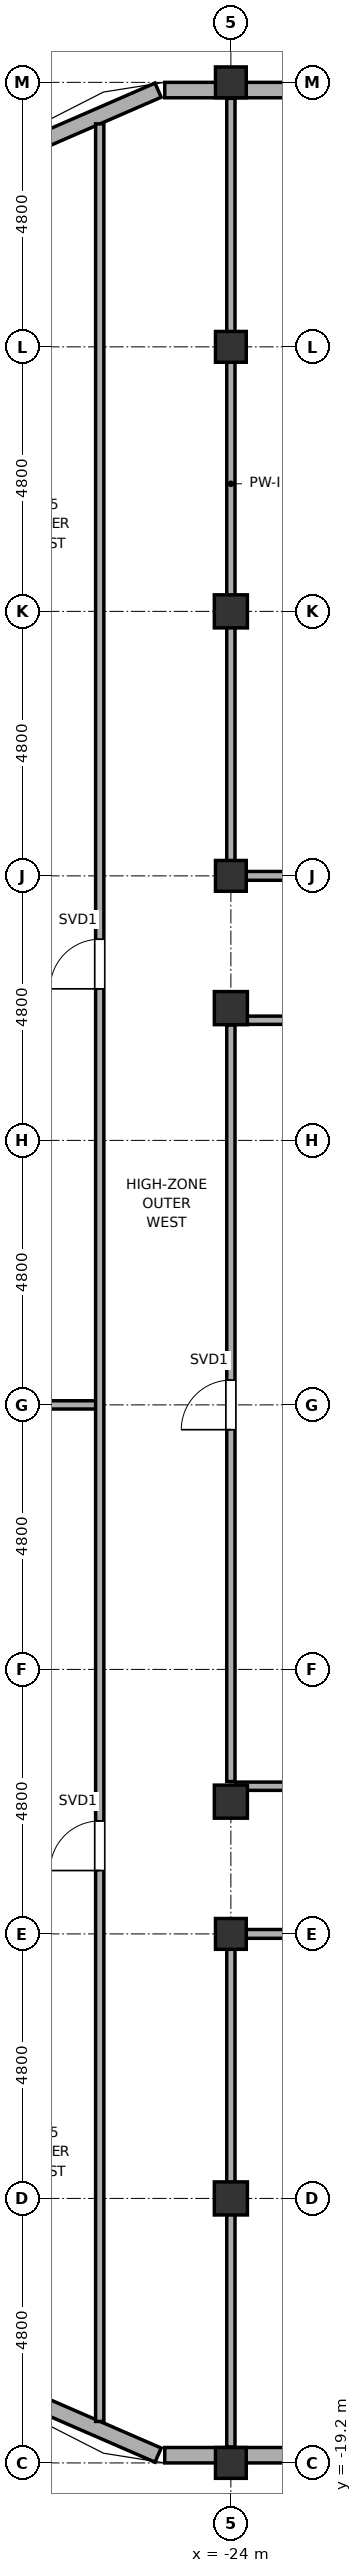
"""IFC4 building model, lengths in metres.
Left out: names, types, materials, properties, quantities, classifications, styles, units other than length and angle.
Written with IfcOpenShell. Run it as: python <this file> out.ifc"""

import sys

from ifc_helpers import new_model, si_unit, direction, frame, frame_2d, origin, origin_2d, place, context, subcontext, project, spatial, rectangle, hollow_rectangle, hollow_circle, extrude, element, fill, save


model = new_model("IFC4")
c1 = context("Model", 3, precision=1e-05, world=origin(), true_north=direction((0.0, 1.0)))
c2 = subcontext(c1, "Body", "Model", "MODEL_VIEW")
j1 = project(units=[si_unit("LENGTHUNIT", "METRE"), si_unit("PLANEANGLEUNIT", "RADIAN")], contexts=[c1])
p1 = place(None, origin())
s1 = spatial("IfcSite", under=j1, at=p1, CompositionType="ELEMENT")
p2 = place(p1, origin())
s2 = spatial("IfcBuilding", under=s1, at=p2, CompositionType="ELEMENT")
p3 = place(p2, frame((0.0, 0.0, 222.3)))
s3 = spatial("IfcBuildingStorey", under=s2, at=p3, CompositionType="ELEMENT", Elevation=222.3)
p4 = place(p3, frame((-24.0, -19.2, 0.0), z_axis=(0.0, 0.0, 1.0), x_axis=(1.0, 0.0, 0.0)))
e1 = element("IfcColumn", 1, at=p4, inside=s3, PredefinedType="COLUMN", context=c2, shape_type="SweptSolid", body=[
    extrude(hollow_circle(Radius=0.28, WallThickness=0.025, at=origin_2d()), origin(), (0.0, 0.0, 1.0), 3.85),
])
p5 = place(p3, frame((-24.0, -14.4, 0.0), z_axis=(0.0, 0.0, 1.0), x_axis=(1.0, 0.0, 0.0)))
e2 = element("IfcColumn", 2, at=p5, inside=s3, PredefinedType="COLUMN", context=c2, shape_type="SweptSolid", body=[
    extrude(hollow_rectangle(XDim=0.6, YDim=0.6, WallThickness=0.028, at=origin_2d()), origin(), (0.0, 0.0, 1.0), 3.85),
])
p6 = place(p3, frame((-24.0, -9.6, 0.0), z_axis=(0.0, 0.0, 1.0), x_axis=(1.0, 0.0, 0.0)))
e3 = element("IfcColumn", 3, at=p6, inside=s3, PredefinedType="COLUMN", context=c2, shape_type="SweptSolid", body=[
    extrude(hollow_circle(Radius=0.28, WallThickness=0.025, at=origin_2d()), origin(), (0.0, 0.0, 1.0), 3.85),
])
for number, where, z_axis, x_axis in (
    (4, (-24.0, -7.2, 0.0), (0.0, 0.0, 1.0), (1.0, 0.0, 0.0)),
    (5, (-24.0, 7.2, 0.0), (0.0, 0.0, 1.0), (1.0, 0.0, 0.0)),
):
    element("IfcColumn", number, at=place(p3, frame(where, z_axis=z_axis, x_axis=x_axis)), inside=s3, PredefinedType="COLUMN", context=c2, shape_type="SweptSolid", body=[
        extrude(hollow_rectangle(XDim=0.6, YDim=0.6, WallThickness=0.028, at=origin_2d()), origin(), (0.0, 0.0, 1.0), 3.85),
    ])
p7 = place(p3, frame((-24.0, 9.6, 0.0), z_axis=(0.0, 0.0, 1.0), x_axis=(1.0, 0.0, 0.0)))
e6 = element("IfcColumn", 6, at=p7, inside=s3, PredefinedType="COLUMN", context=c2, shape_type="SweptSolid", body=[
    extrude(hollow_circle(Radius=0.28, WallThickness=0.025, at=origin_2d()), origin(), (0.0, 0.0, 1.0), 3.85),
])
p8 = place(p3, frame((-24.0, 14.4, 0.0), z_axis=(0.0, 0.0, 1.0), x_axis=(1.0, 0.0, 0.0)))
e7 = element("IfcColumn", 7, at=p8, inside=s3, PredefinedType="COLUMN", context=c2, shape_type="SweptSolid", body=[
    extrude(hollow_rectangle(XDim=0.6, YDim=0.6, WallThickness=0.028, at=origin_2d()), origin(), (0.0, 0.0, 1.0), 3.85),
])
p9 = place(p3, frame((-24.0, 19.2, 0.0), z_axis=(0.0, 0.0, 1.0), x_axis=(1.0, 0.0, 0.0)))
e8 = element("IfcColumn", 8, at=p9, inside=s3, PredefinedType="COLUMN", context=c2, shape_type="SweptSolid", body=[
    extrude(hollow_circle(Radius=0.28, WallThickness=0.025, at=origin_2d()), origin(), (0.0, 0.0, 1.0), 3.85),
])
p10 = place(p3, frame((-24.0, 24.0, -0.18), z_axis=(0.0, 0.0, 1.0), x_axis=(1.0, 0.0, 0.0)))
e9 = element("IfcColumn", 9, at=p10, inside=s3, PredefinedType="COLUMN", context=c2, shape_type="SweptSolid", body=[
    extrude(hollow_circle(Radius=0.28, WallThickness=0.025, at=origin_2d()), origin(), (0.0, 0.0, 1.0), 4.03),
])
for number, where, z_axis, x_axis in (
    (10, (-27.646, -18.047, 0.0), (0.0, 0.0, 1.0), (0.917, -0.399, 0.0)),
    (11, (-25.321, 23.858, 0.0), (0.0, 0.0, 1.0), (-0.917, -0.399, 0.0)),
):
    element("IfcWall", number, at=place(p3, frame(where, z_axis=z_axis, x_axis=x_axis)), inside=s3, PredefinedType="SOLIDWALL", context=c2, shape_type="SweptSolid", body=[
        extrude(rectangle(XDim=2.536, YDim=0.28, at=frame_2d((1.268, 0.0))), origin(), (0.0, 0.0, 1.0), 2.27),
    ])
p11 = place(p3, frame((-25.2, -19.06, 0.0), z_axis=(0.0, 0.0, 1.0), x_axis=(1.0, 0.0, 0.0)))
e12 = element("IfcWall", 12, at=p11, inside=s3, PredefinedType="SOLIDWALL", context=c2, shape_type="SweptSolid", body=[
    extrude(rectangle(XDim=20.45, YDim=0.28, at=frame_2d((10.225, 0.0))), origin(), (0.0, 0.0, 1.0), 2.27),
])
p12 = place(p11, frame((12.3, 0.0, 0.0)))
e13 = element("IfcOpeningElement", 13, at=p12, cuts=e12, PredefinedType="OPENING", context=c2, shape_type="SweptSolid", body=[
    extrude(rectangle(XDim=1.8, YDim=2.02, at=frame_2d((0.9, 1.01))), frame((0.0, 0.155, 0.0), z_axis=(0.0, -1.0, 0.0), x_axis=(1.0, 0.0, 0.0)), (0.0, 0.0, 1.0), 0.31),
])
p13 = place(p11, frame((7.8, 0.0, 0.75)))
e14 = element("IfcOpeningElement", 14, at=p13, cuts=e12, PredefinedType="OPENING", context=c2, shape_type="SweptSolid", body=[
    extrude(rectangle(XDim=1.2, YDim=1.15, at=frame_2d((0.6, 0.575))), frame((0.0, 0.155, 0.0), z_axis=(0.0, -1.0, 0.0), x_axis=(1.0, 0.0, 0.0)), (0.0, 0.0, 1.0), 0.31),
])
p14 = place(p3, frame((-25.2, 23.86, 0.0), z_axis=(0.0, 0.0, 1.0), x_axis=(1.0, 0.0, 0.0)))
e15 = element("IfcWall", 15, at=p14, inside=s3, PredefinedType="SOLIDWALL", context=c2, shape_type="SweptSolid", body=[
    extrude(rectangle(XDim=20.45, YDim=0.28, at=frame_2d((10.225, 0.0))), origin(), (0.0, 0.0, 1.0), 2.27),
])
p15 = place(p14, frame((9.0, 0.0, 0.75)))
e16 = element("IfcOpeningElement", 16, at=p15, cuts=e15, PredefinedType="OPENING", context=c2, shape_type="SweptSolid", body=[
    extrude(rectangle(XDim=1.2, YDim=1.15, at=frame_2d((0.6, 0.575))), frame((0.0, 0.155, 0.0), z_axis=(0.0, -1.0, 0.0), x_axis=(1.0, 0.0, 0.0)), (0.0, 0.0, 1.0), 0.31),
])
p16 = place(p14, frame((12.6, 0.0, 0.75)))
e17 = element("IfcOpeningElement", 17, at=p16, cuts=e15, PredefinedType="OPENING", context=c2, shape_type="SweptSolid", body=[
    extrude(rectangle(XDim=1.2, YDim=1.15, at=frame_2d((0.6, 0.575))), frame((0.0, 0.155, 0.0), z_axis=(0.0, -1.0, 0.0), x_axis=(1.0, 0.0, 0.0)), (0.0, 0.0, 1.0), 0.31),
])
p17 = place(p14, frame((17.4, 0.0, 0.75)))
e18 = element("IfcOpeningElement", 18, at=p17, cuts=e15, PredefinedType="OPENING", context=c2, shape_type="SweptSolid", body=[
    extrude(rectangle(XDim=1.2, YDim=1.15, at=frame_2d((0.6, 0.575))), frame((0.0, 0.155, 0.0), z_axis=(0.0, -1.0, 0.0), x_axis=(1.0, 0.0, 0.0)), (0.0, 0.0, 1.0), 0.31),
])
p18 = place(p3, frame((-23.92, -9.6, 0.0), z_axis=(0.0, 0.0, 1.0), x_axis=(1.0, 0.0, 0.0)))
e19 = element("IfcWall", 19, at=p18, inside=s3, PredefinedType="PARTITIONING", context=c2, shape_type="SweptSolid", body=[
    extrude(rectangle(XDim=47.84, YDim=0.16, at=frame_2d((23.92, 0.0))), origin(), (0.0, 0.0, 1.0), 2.27),
])
p19 = place(p18, frame((1.87, 0.0, 0.0)))
e20 = element("IfcOpeningElement", 20, at=p19, cuts=e19, PredefinedType="OPENING", context=c2, shape_type="SweptSolid", body=[
    extrude(rectangle(XDim=0.9, YDim=2.1, at=frame_2d((0.45, 1.05))), frame((0.0, 0.095, 0.0), z_axis=(0.0, -1.0, 0.0), x_axis=(1.0, 0.0, 0.0)), (0.0, 0.0, 1.0), 0.19),
])
p20 = place(p18, frame((45.07, 0.0, 0.0)))
e21 = element("IfcOpeningElement", 21, at=p20, cuts=e19, PredefinedType="OPENING", context=c2, shape_type="SweptSolid", body=[
    extrude(rectangle(XDim=0.9, YDim=2.1, at=frame_2d((0.45, 1.05))), frame((0.0, 0.095, 0.0), z_axis=(0.0, -1.0, 0.0), x_axis=(1.0, 0.0, 0.0)), (0.0, 0.0, 1.0), 0.19),
])
p21 = place(p18, frame((6.67, 0.0, 0.0)))
e22 = element("IfcOpeningElement", 22, at=p21, cuts=e19, PredefinedType="OPENING", context=c2, shape_type="SweptSolid", body=[
    extrude(rectangle(XDim=0.9, YDim=2.1, at=frame_2d((0.45, 1.05))), frame((0.0, 0.095, 0.0), z_axis=(0.0, -1.0, 0.0), x_axis=(1.0, 0.0, 0.0)), (0.0, 0.0, 1.0), 0.19),
])
p22 = place(p18, frame((11.47, 0.0, 0.0)))
e23 = element("IfcOpeningElement", 23, at=p22, cuts=e19, PredefinedType="OPENING", context=c2, shape_type="SweptSolid", body=[
    extrude(rectangle(XDim=0.9, YDim=2.1, at=frame_2d((0.45, 1.05))), frame((0.0, 0.095, 0.0), z_axis=(0.0, -1.0, 0.0), x_axis=(1.0, 0.0, 0.0)), (0.0, 0.0, 1.0), 0.19),
])
p23 = place(p18, frame((16.27, 0.0, 0.0)))
e24 = element("IfcOpeningElement", 24, at=p23, cuts=e19, PredefinedType="OPENING", context=c2, shape_type="SweptSolid", body=[
    extrude(rectangle(XDim=0.9, YDim=2.1, at=frame_2d((0.45, 1.05))), frame((0.0, 0.095, 0.0), z_axis=(0.0, -1.0, 0.0), x_axis=(1.0, 0.0, 0.0)), (0.0, 0.0, 1.0), 0.19),
])
p24 = place(p18, frame((34.89, 0.0, 0.0)))
e25 = element("IfcOpeningElement", 25, at=p24, cuts=e19, PredefinedType="OPENING", context=c2, shape_type="SweptSolid", body=[
    extrude(rectangle(XDim=0.92, YDim=2.15, at=frame_2d((0.46, 1.075))), frame((0.0, 0.095, 0.0), z_axis=(0.0, -1.0, 0.0), x_axis=(1.0, 0.0, 0.0)), (0.0, 0.0, 1.0), 0.19),
])
p25 = place(p18, frame((40.83, 0.0, 0.0)))
e26 = element("IfcOpeningElement", 26, at=p25, cuts=e19, PredefinedType="OPENING", context=c2, shape_type="SweptSolid", body=[
    extrude(rectangle(XDim=0.92, YDim=2.15, at=frame_2d((0.46, 1.075))), frame((0.0, 0.095, 0.0), z_axis=(0.0, -1.0, 0.0), x_axis=(1.0, 0.0, 0.0)), (0.0, 0.0, 1.0), 0.19),
])
p26 = place(p3, frame((-23.92, -6.92, 0.0), z_axis=(0.0, 0.0, 1.0), x_axis=(1.0, 0.0, 0.0)))
e27 = element("IfcWall", 27, at=p26, inside=s3, PredefinedType="PARTITIONING", context=c2, shape_type="SweptSolid", body=[
    extrude(rectangle(XDim=9.4, YDim=0.15, at=frame_2d((4.7, 0.0))), origin(), (0.0, 0.0, 1.0), 2.27),
])
p27 = place(p3, frame((-28.63, 0.0, 0.0), z_axis=(0.0, 0.0, 1.0), x_axis=(1.0, 0.0, 0.0)))
e28 = element("IfcWall", 28, at=p27, inside=s3, PredefinedType="PARTITIONING", context=c2, shape_type="SweptSolid", body=[
    extrude(rectangle(XDim=2.25, YDim=0.15, at=frame_2d((1.125, 0.0))), origin(), (0.0, 0.0, 1.0), 3.12),
])
p28 = place(p3, frame((-23.92, 6.98, 0.0), z_axis=(0.0, 0.0, 1.0), x_axis=(1.0, 0.0, 0.0)))
e29 = element("IfcWall", 29, at=p28, inside=s3, PredefinedType="PARTITIONING", context=c2, shape_type="SweptSolid", body=[
    extrude(rectangle(XDim=9.4, YDim=0.15, at=frame_2d((4.7, 0.0))), origin(), (0.0, 0.0, 1.0), 2.27),
])
p29 = place(p3, frame((-23.92, 9.6, 0.0), z_axis=(0.0, 0.0, 1.0), x_axis=(1.0, 0.0, 0.0)))
e30 = element("IfcWall", 30, at=p29, inside=s3, PredefinedType="PARTITIONING", context=c2, shape_type="SweptSolid", body=[
    extrude(rectangle(XDim=47.84, YDim=0.16, at=frame_2d((23.92, 0.0))), origin(), (0.0, 0.0, 1.0), 2.27),
])
p30 = place(p29, frame((1.87, 0.0, 0.0)))
e31 = element("IfcOpeningElement", 31, at=p30, cuts=e30, PredefinedType="OPENING", context=c2, shape_type="SweptSolid", body=[
    extrude(rectangle(XDim=0.9, YDim=2.1, at=frame_2d((0.45, 1.05))), frame((0.0, 0.095, 0.0), z_axis=(0.0, -1.0, 0.0), x_axis=(1.0, 0.0, 0.0)), (0.0, 0.0, 1.0), 0.19),
])
p31 = place(p29, frame((45.07, 0.0, 0.0)))
e32 = element("IfcOpeningElement", 32, at=p31, cuts=e30, PredefinedType="OPENING", context=c2, shape_type="SweptSolid", body=[
    extrude(rectangle(XDim=0.9, YDim=2.1, at=frame_2d((0.45, 1.05))), frame((0.0, 0.095, 0.0), z_axis=(0.0, -1.0, 0.0), x_axis=(1.0, 0.0, 0.0)), (0.0, 0.0, 1.0), 0.19),
])
p32 = place(p29, frame((5.98, 0.0, 0.0)))
e33 = element("IfcOpeningElement", 33, at=p32, cuts=e30, PredefinedType="OPENING", context=c2, shape_type="SweptSolid", body=[
    extrude(rectangle(XDim=0.9, YDim=2.1, at=frame_2d((0.45, 1.05))), frame((0.0, 0.095, 0.0), z_axis=(0.0, -1.0, 0.0), x_axis=(1.0, 0.0, 0.0)), (0.0, 0.0, 1.0), 0.19),
])
p33 = place(p29, frame((7.87, 0.0, 0.0)))
e34 = element("IfcOpeningElement", 34, at=p33, cuts=e30, PredefinedType="OPENING", context=c2, shape_type="SweptSolid", body=[
    extrude(rectangle(XDim=0.9, YDim=2.1, at=frame_2d((0.45, 1.05))), frame((0.0, 0.095, 0.0), z_axis=(0.0, -1.0, 0.0), x_axis=(1.0, 0.0, 0.0)), (0.0, 0.0, 1.0), 0.19),
])
p34 = place(p29, frame((10.395, 0.0, 0.0)))
e35 = element("IfcOpeningElement", 35, at=p34, cuts=e30, PredefinedType="OPENING", context=c2, shape_type="SweptSolid", body=[
    extrude(rectangle(XDim=0.92, YDim=2.15, at=frame_2d((0.46, 1.075))), frame((0.0, 0.095, 0.0), z_axis=(0.0, -1.0, 0.0), x_axis=(1.0, 0.0, 0.0)), (0.0, 0.0, 1.0), 0.19),
])
p35 = place(p29, frame((17.325, 0.0, 0.0)))
e36 = element("IfcOpeningElement", 36, at=p35, cuts=e30, PredefinedType="OPENING", context=c2, shape_type="SweptSolid", body=[
    extrude(rectangle(XDim=0.92, YDim=2.15, at=frame_2d((0.46, 1.075))), frame((0.0, 0.095, 0.0), z_axis=(0.0, -1.0, 0.0), x_axis=(1.0, 0.0, 0.0)), (0.0, 0.0, 1.0), 0.19),
])
p36 = place(p29, frame((21.07, 0.0, 0.0)))
e37 = element("IfcOpeningElement", 37, at=p36, cuts=e30, PredefinedType="OPENING", context=c2, shape_type="SweptSolid", body=[
    extrude(rectangle(XDim=0.9, YDim=2.1, at=frame_2d((0.45, 1.05))), frame((0.0, 0.095, 0.0), z_axis=(0.0, -1.0, 0.0), x_axis=(1.0, 0.0, 0.0)), (0.0, 0.0, 1.0), 0.19),
])
p37 = place(p29, frame((35.47, 0.0, 0.0)))
e38 = element("IfcOpeningElement", 38, at=p37, cuts=e30, PredefinedType="OPENING", context=c2, shape_type="SweptSolid", body=[
    extrude(rectangle(XDim=0.9, YDim=2.1, at=frame_2d((0.45, 1.05))), frame((0.0, 0.095, 0.0), z_axis=(0.0, -1.0, 0.0), x_axis=(1.0, 0.0, 0.0)), (0.0, 0.0, 1.0), 0.19),
])
p38 = place(p3, frame((-26.38, -18.447, 0.0), z_axis=(0.0, 0.0, 1.0), x_axis=(0.0, 1.0, 0.0)))
e39 = element("IfcWall", 39, at=p38, inside=s3, PredefinedType="PARTITIONING", context=c2, shape_type="SweptSolid", body=[
    extrude(rectangle(XDim=41.695, YDim=0.15, at=frame_2d((20.847, 0.0))), origin(), (0.0, 0.0, 1.0), 2.27),
])
p39 = place(p38, frame((9.997, 0.0, 0.0)))
e40 = element("IfcOpeningElement", 40, at=p39, cuts=e39, PredefinedType="OPENING", context=c2, shape_type="SweptSolid", body=[
    extrude(rectangle(XDim=0.9, YDim=2.1, at=frame_2d((0.45, 1.05))), frame((0.0, 0.09, 0.0), z_axis=(0.0, -1.0, 0.0), x_axis=(1.0, 0.0, 0.0)), (0.0, 0.0, 1.0), 0.18),
])
p40 = place(p38, frame((25.997, 0.0, 0.0)))
e41 = element("IfcOpeningElement", 41, at=p40, cuts=e39, PredefinedType="OPENING", context=c2, shape_type="SweptSolid", body=[
    extrude(rectangle(XDim=0.9, YDim=2.1, at=frame_2d((0.45, 1.05))), frame((0.0, 0.09, 0.0), z_axis=(0.0, -1.0, 0.0), x_axis=(1.0, 0.0, 0.0)), (0.0, 0.0, 1.0), 0.18),
])
p41 = place(p3, frame((-24.0, -18.91, 0.0), z_axis=(0.0, 0.0, 1.0), x_axis=(0.0, 1.0, 0.0)))
e42 = element("IfcWall", 42, at=p41, inside=s3, PredefinedType="PARTITIONING", context=c2, shape_type="SweptSolid", body=[
    extrude(rectangle(XDim=9.19, YDim=0.15, at=frame_2d((4.595, 0.0))), origin(), (0.0, 0.0, 1.0), 2.27),
])
p42 = place(p3, frame((-24.0, -6.835, 0.0), z_axis=(0.0, 0.0, 1.0), x_axis=(0.0, 1.0, 0.0)))
e43 = element("IfcWall", 43, at=p42, inside=s3, PredefinedType="PARTITIONING", context=c2, shape_type="SweptSolid", body=[
    extrude(rectangle(XDim=13.73, YDim=0.15, at=frame_2d((6.865, 0.0))), origin(), (0.0, 0.0, 1.0), 2.27),
])
p43 = place(p42, frame((6.385, 0.0, 0.0)))
e44 = element("IfcOpeningElement", 44, at=p43, cuts=e43, PredefinedType="OPENING", context=c2, shape_type="SweptSolid", body=[
    extrude(rectangle(XDim=0.9, YDim=2.1, at=frame_2d((0.45, 1.05))), frame((0.0, 0.09, 0.0), z_axis=(0.0, -1.0, 0.0), x_axis=(1.0, 0.0, 0.0)), (0.0, 0.0, 1.0), 0.18),
])
p44 = place(p3, frame((-24.0, 9.72, 0.0), z_axis=(0.0, 0.0, 1.0), x_axis=(0.0, 1.0, 0.0)))
e45 = element("IfcWall", 45, at=p44, inside=s3, PredefinedType="PARTITIONING", context=c2, shape_type="SweptSolid", body=[
    extrude(rectangle(XDim=13.99, YDim=0.15, at=frame_2d((6.995, 0.0))), origin(), (0.0, 0.0, 1.0), 2.27),
])
p45 = place(p43, origin())
e46 = element("IfcDoor", 46, at=p45, inside=s3, OperationType="SINGLE_SWING_RIGHT", PredefinedType="DOOR", context=c2, shape_type="SweptSolid", body=[
    extrude(rectangle(XDim=0.9, YDim=2.1, at=frame_2d((0.45, 1.05))), frame((0.0, 0.025, 0.0), z_axis=(0.0, -1.0, 0.0), x_axis=(1.0, 0.0, 0.0)), (0.0, 0.0, 1.0), 0.05),
])
fill(e44, e46)
p46 = place(p39, origin())
e47 = element("IfcDoor", 47, at=p46, inside=s3, OperationType="SINGLE_SWING_LEFT", PredefinedType="DOOR", context=c2, shape_type="SweptSolid", body=[
    extrude(rectangle(XDim=0.9, YDim=2.1, at=frame_2d((0.45, 1.05))), frame((0.0, 0.025, 0.0), z_axis=(0.0, -1.0, 0.0), x_axis=(1.0, 0.0, 0.0)), (0.0, 0.0, 1.0), 0.05),
])
fill(e40, e47)
p47 = place(p40, origin())
e48 = element("IfcDoor", 48, at=p47, inside=s3, OperationType="SINGLE_SWING_LEFT", PredefinedType="DOOR", context=c2, shape_type="SweptSolid", body=[
    extrude(rectangle(XDim=0.9, YDim=2.1, at=frame_2d((0.45, 1.05))), frame((0.0, 0.025, 0.0), z_axis=(0.0, -1.0, 0.0), x_axis=(1.0, 0.0, 0.0)), (0.0, 0.0, 1.0), 0.05),
])
fill(e41, e48)
save(model, sys.argv[1])
